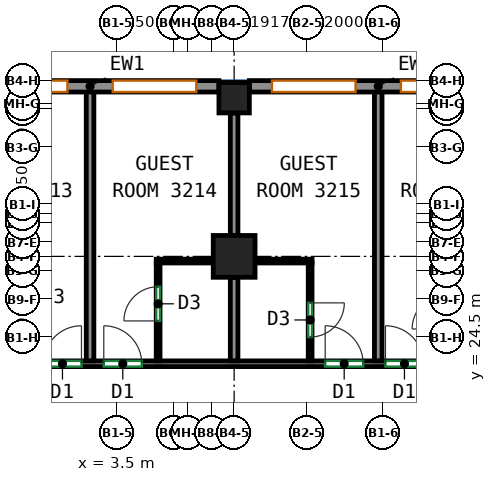
"""IFC4 building model, lengths in metres.
Left out: names, types, materials, properties, quantities, classifications, styles, units other than length and angle.
Written with IfcOpenShell. Run it as: python <this file> out.ifc"""

import sys

from ifc_helpers import new_model, si_unit, direction, frame, frame_2d, origin, origin_2d, place, context, subcontext, project, spatial, rectangle, extrude, source, transform, mapped, element, fill, save


model = new_model("IFC4")
c1 = context("Model", 3, precision=1e-05, world=origin(), true_north=direction((0.0, 1.0)))
c2 = subcontext(c1, "Body", "Model", "MODEL_VIEW")
j1 = project(units=[si_unit("LENGTHUNIT", "METRE"), si_unit("PLANEANGLEUNIT", "RADIAN")], contexts=[c1])
p1 = place(None, origin())
s1 = spatial("IfcSite", under=j1, at=p1, CompositionType="ELEMENT")
p2 = place(p1, origin())
s2 = spatial("IfcBuilding", under=s1, at=p2, CompositionType="ELEMENT")
p3 = place(p2, frame((0.0, 0.0, 143.9)))
s3 = spatial("IfcBuildingStorey", under=s2, at=p3, CompositionType="ELEMENT", Elevation=143.9)
m1 = source(origin(), c2, "Body", "SweptSolid", [
    extrude(rectangle(XDim=1.1, YDim=1.1, at=origin_2d()), origin(), (0.0, 0.0, 1.0), 3.12),
])
p4 = place(p3, frame((6.583, 26.625, 0.0), z_axis=(0.0, 0.0, 1.0), x_axis=(1.0, 0.0, 0.0)))
e1 = element("IfcColumn", 1, at=p4, inside=s3, PredefinedType="COLUMN", context=c2, shape_type="MappedRepresentation", body=[
    mapped(m1, transform((0.0, 0.0, 0.0))),
])
m2 = source(origin(), c2, "Body", "SweptSolid", [
    extrude(rectangle(XDim=0.8, YDim=0.8, at=origin_2d()), origin(), (0.0, 0.0, 1.0), 3.12),
])
p5 = place(p3, frame((6.583, 30.8, 0.0), z_axis=(0.0, 0.0, 1.0), x_axis=(1.0, 0.0, 0.0)))
e2 = element("IfcColumn", 2, at=p5, inside=s3, PredefinedType="COLUMN", context=c2, shape_type="MappedRepresentation", body=[
    mapped(m2, transform((0.0, 0.0, 0.0))),
])
m3 = source(origin(), c2, "Body", "SweptSolid", [
    extrude(rectangle(XDim=6.783, YDim=0.3, at=frame_2d((3.392, 0.0))), origin(), (0.0, 0.0, 1.0), 3.12),
])
p6 = place(p3, frame((13.767, 31.1, 0.0), z_axis=(0.0, 0.0, 1.0), x_axis=(-1.0, 0.0, 0.0)))
e3 = element("IfcWall", 3, at=p6, inside=s3, PredefinedType="SOLIDWALL", context=c2, shape_type="MappedRepresentation", body=[
    mapped(m3, transform((0.0, 0.0, 0.0))),
])
p7 = place(p6, frame((0.596, 0.0, 0.85)))
e4 = element("IfcOpeningElement", 4, at=p7, cuts=e3, PredefinedType="OPENING", context=c2, shape_type="SweptSolid", body=[
    extrude(rectangle(XDim=2.2, YDim=1.95, at=frame_2d((1.1, 0.975))), frame((0.0, 0.16, 0.0), z_axis=(0.0, -1.0, 0.0), x_axis=(1.0, 0.0, 0.0)), (0.0, 0.0, 1.0), 0.32),
])
p8 = place(p6, frame((3.988, 0.0, 0.85)))
e5 = element("IfcOpeningElement", 5, at=p8, cuts=e3, PredefinedType="OPENING", context=c2, shape_type="SweptSolid", body=[
    extrude(rectangle(XDim=2.2, YDim=1.95, at=frame_2d((1.1, 0.975))), frame((0.0, 0.16, 0.0), z_axis=(0.0, -1.0, 0.0), x_axis=(1.0, 0.0, 0.0)), (0.0, 0.0, 1.0), 0.32),
])
m4 = source(origin(), c2, "Body", "SweptSolid", [
    extrude(rectangle(XDim=6.783, YDim=0.3, at=frame_2d((3.392, 0.0))), origin(), (0.0, 0.0, 1.0), 3.12),
])
p9 = place(p3, frame((6.183, 31.1, 0.0), z_axis=(0.0, 0.0, 1.0), x_axis=(-1.0, 0.0, 0.0)))
e6 = element("IfcWall", 6, at=p9, inside=s3, PredefinedType="SOLIDWALL", context=c2, shape_type="MappedRepresentation", body=[
    mapped(m4, transform((0.0, 0.0, 0.0))),
])
p10 = place(p9, frame((0.596, 0.0, 0.85)))
e7 = element("IfcOpeningElement", 7, at=p10, cuts=e6, PredefinedType="OPENING", context=c2, shape_type="SweptSolid", body=[
    extrude(rectangle(XDim=2.2, YDim=1.95, at=frame_2d((1.1, 0.975))), frame((0.0, 0.16, 0.0), z_axis=(0.0, -1.0, 0.0), x_axis=(1.0, 0.0, 0.0)), (0.0, 0.0, 1.0), 0.32),
])
p11 = place(p9, frame((3.988, 0.0, 0.85)))
e8 = element("IfcOpeningElement", 8, at=p11, cuts=e6, PredefinedType="OPENING", context=c2, shape_type="SweptSolid", body=[
    extrude(rectangle(XDim=2.2, YDim=1.95, at=frame_2d((1.1, 0.975))), frame((0.0, 0.16, 0.0), z_axis=(0.0, -1.0, 0.0), x_axis=(1.0, 0.0, 0.0)), (0.0, 0.0, 1.0), 0.32),
])
p12 = place(p3, frame((-20.059, 23.8, 0.0), z_axis=(0.0, 0.0, 1.0), x_axis=(1.0, 0.0, 0.0)))
e9 = element("IfcWall", 9, at=p12, inside=s3, PredefinedType="PARTITIONING", context=c2, shape_type="SweptSolid", body=[
    extrude(rectangle(XDim=41.909, YDim=0.15, at=frame_2d((20.955, 0.0))), origin(), (0.0, 0.0, 1.0), 3.12),
])
p13 = place(p12, frame((0.401, 0.0, 0.0)))
e10 = element("IfcOpeningElement", 10, at=p13, cuts=e9, PredefinedType="OPENING", context=c2, shape_type="SweptSolid", body=[
    extrude(rectangle(XDim=1.0, YDim=2.1, at=frame_2d((0.5, 1.05))), frame((0.0, 0.085, 0.0), z_axis=(0.0, -1.0, 0.0), x_axis=(1.0, 0.0, 0.0)), (0.0, 0.0, 1.0), 0.17),
])
p14 = place(p12, frame((6.082, 0.0, 0.0)))
e11 = element("IfcOpeningElement", 11, at=p14, cuts=e9, PredefinedType="OPENING", context=c2, shape_type="SweptSolid", body=[
    extrude(rectangle(XDim=1.0, YDim=2.1, at=frame_2d((0.5, 1.05))), frame((0.0, 0.085, 0.0), z_axis=(0.0, -1.0, 0.0), x_axis=(1.0, 0.0, 0.0)), (0.0, 0.0, 1.0), 0.17),
])
p15 = place(p12, frame((8.08, 0.0, 0.0)))
e12 = element("IfcOpeningElement", 12, at=p15, cuts=e9, PredefinedType="OPENING", context=c2, shape_type="SweptSolid", body=[
    extrude(rectangle(XDim=1.0, YDim=2.1, at=frame_2d((0.5, 1.05))), frame((0.0, 0.085, 0.0), z_axis=(0.0, -1.0, 0.0), x_axis=(1.0, 0.0, 0.0)), (0.0, 0.0, 1.0), 0.17),
])
p16 = place(p12, frame((13.769, 0.0, 0.0)))
e13 = element("IfcOpeningElement", 13, at=p16, cuts=e9, PredefinedType="OPENING", context=c2, shape_type="SweptSolid", body=[
    extrude(rectangle(XDim=1.0, YDim=2.1, at=frame_2d((0.5, 1.05))), frame((0.0, 0.085, 0.0), z_axis=(0.0, -1.0, 0.0), x_axis=(1.0, 0.0, 0.0)), (0.0, 0.0, 1.0), 0.17),
])
p17 = place(p12, frame((15.56, 0.0, 0.0)))
e14 = element("IfcOpeningElement", 14, at=p17, cuts=e9, PredefinedType="OPENING", context=c2, shape_type="SweptSolid", body=[
    extrude(rectangle(XDim=1.0, YDim=2.1, at=frame_2d((0.5, 1.05))), frame((0.0, 0.085, 0.0), z_axis=(0.0, -1.0, 0.0), x_axis=(1.0, 0.0, 0.0)), (0.0, 0.0, 1.0), 0.17),
])
p18 = place(p12, frame((21.625, 0.0, 0.0)))
e15 = element("IfcOpeningElement", 15, at=p18, cuts=e9, PredefinedType="OPENING", context=c2, shape_type="SweptSolid", body=[
    extrude(rectangle(XDim=1.0, YDim=2.1, at=frame_2d((0.5, 1.05))), frame((0.0, 0.085, 0.0), z_axis=(0.0, -1.0, 0.0), x_axis=(1.0, 0.0, 0.0)), (0.0, 0.0, 1.0), 0.17),
])
p19 = place(p12, frame((23.212, 0.0, 0.0)))
e16 = element("IfcOpeningElement", 16, at=p19, cuts=e9, PredefinedType="OPENING", context=c2, shape_type="SweptSolid", body=[
    extrude(rectangle(XDim=1.0, YDim=2.1, at=frame_2d((0.5, 1.05))), frame((0.0, 0.085, 0.0), z_axis=(0.0, -1.0, 0.0), x_axis=(1.0, 0.0, 0.0)), (0.0, 0.0, 1.0), 0.17),
])
p20 = place(p12, frame((29.038, 0.0, 0.0)))
e17 = element("IfcOpeningElement", 17, at=p20, cuts=e9, PredefinedType="OPENING", context=c2, shape_type="SweptSolid", body=[
    extrude(rectangle(XDim=1.0, YDim=2.1, at=frame_2d((0.5, 1.05))), frame((0.0, 0.085, 0.0), z_axis=(0.0, -1.0, 0.0), x_axis=(1.0, 0.0, 0.0)), (0.0, 0.0, 1.0), 0.17),
])
p21 = place(p12, frame((30.624, 0.0, 0.0)))
e18 = element("IfcOpeningElement", 18, at=p21, cuts=e9, PredefinedType="OPENING", context=c2, shape_type="SweptSolid", body=[
    extrude(rectangle(XDim=1.0, YDim=2.1, at=frame_2d((0.5, 1.05))), frame((0.0, 0.085, 0.0), z_axis=(0.0, -1.0, 0.0), x_axis=(1.0, 0.0, 0.0)), (0.0, 0.0, 1.0), 0.17),
])
p22 = place(p12, frame((36.622, 0.0, 0.0)))
e19 = element("IfcOpeningElement", 19, at=p22, cuts=e9, PredefinedType="OPENING", context=c2, shape_type="SweptSolid", body=[
    extrude(rectangle(XDim=1.0, YDim=2.1, at=frame_2d((0.5, 1.05))), frame((0.0, 0.085, 0.0), z_axis=(0.0, -1.0, 0.0), x_axis=(1.0, 0.0, 0.0)), (0.0, 0.0, 1.0), 0.17),
])
p23 = place(p12, frame((38.516, 0.0, 0.0)))
e20 = element("IfcOpeningElement", 20, at=p23, cuts=e9, PredefinedType="OPENING", context=c2, shape_type="SweptSolid", body=[
    extrude(rectangle(XDim=1.0, YDim=2.1, at=frame_2d((0.5, 1.05))), frame((0.0, 0.085, 0.0), z_axis=(0.0, -1.0, 0.0), x_axis=(1.0, 0.0, 0.0)), (0.0, 0.0, 1.0), 0.17),
])
p24 = place(p3, frame((2.792, 23.877, 0.0), z_axis=(0.0, 0.0, 1.0), x_axis=(0.0, 1.0, 0.0)))
e21 = element("IfcWall", 21, at=p24, inside=s3, PredefinedType="PARTITIONING", context=c2, shape_type="SweptSolid", body=[
    extrude(rectangle(XDim=7.123, YDim=0.2, at=frame_2d((3.562, 0.0))), origin(), (0.0, 0.0, 1.0), 3.12),
])
p25 = place(p3, frame((4.533, 26.502, 0.0), z_axis=(0.0, 0.0, 1.0), x_axis=(1.0, 0.0, 0.0)))
e22 = element("IfcWall", 22, at=p25, inside=s3, PredefinedType="PARTITIONING", context=c2, shape_type="SweptSolid", body=[
    extrude(rectangle(XDim=1.5, YDim=0.1, at=frame_2d((0.75, 0.0))), origin(), (0.0, 0.0, 1.0), 3.12),
])
p26 = place(p3, frame((4.583, 23.877, 0.0), z_axis=(0.0, 0.0, 1.0), x_axis=(0.0, 1.0, 0.0)))
e23 = element("IfcWall", 23, at=p26, inside=s3, PredefinedType="PARTITIONING", context=c2, shape_type="SweptSolid", body=[
    extrude(rectangle(XDim=2.575, YDim=0.1, at=frame_2d((1.288, 0.0))), origin(), (0.0, 0.0, 1.0), 3.12),
])
p27 = place(p26, frame((1.05, 0.0, 0.0)))
e24 = element("IfcOpeningElement", 24, at=p27, cuts=e23, PredefinedType="OPENING", context=c2, shape_type="SweptSolid", body=[
    extrude(rectangle(XDim=0.9, YDim=2.1, at=frame_2d((0.45, 1.05))), frame((0.0, 0.06, 0.0), z_axis=(0.0, -1.0, 0.0), x_axis=(1.0, 0.0, 0.0)), (0.0, 0.0, 1.0), 0.12),
])
p28 = place(p3, frame((6.583, 27.175, 0.0), z_axis=(0.0, 0.0, 1.0), x_axis=(0.0, 1.0, 0.0)))
e25 = element("IfcWall", 25, at=p28, inside=s3, PredefinedType="PARTITIONING", context=c2, shape_type="SweptSolid", body=[
    extrude(rectangle(XDim=3.225, YDim=0.2, at=frame_2d((1.612, 0.0))), origin(), (0.0, 0.0, 1.0), 3.12),
])
p29 = place(p3, frame((6.583, 23.877, 0.0), z_axis=(0.0, 0.0, 1.0), x_axis=(0.0, 1.0, 0.0)))
e26 = element("IfcWall", 26, at=p29, inside=s3, PredefinedType="PARTITIONING", context=c2, shape_type="SweptSolid", body=[
    extrude(rectangle(XDim=2.198, YDim=0.2, at=frame_2d((1.099, 0.0))), origin(), (0.0, 0.0, 1.0), 3.12),
])
p30 = place(p3, frame((7.133, 26.502, 0.0), z_axis=(0.0, 0.0, 1.0), x_axis=(1.0, 0.0, 0.0)))
e27 = element("IfcWall", 27, at=p30, inside=s3, PredefinedType="PARTITIONING", context=c2, shape_type="SweptSolid", body=[
    extrude(rectangle(XDim=1.5, YDim=0.1, at=frame_2d((0.75, 0.0))), origin(), (0.0, 0.0, 1.0), 3.12),
])
p31 = place(p3, frame((8.583, 26.452, 0.0), z_axis=(0.0, 0.0, 1.0), x_axis=(0.0, -1.0, 0.0)))
e28 = element("IfcWall", 28, at=p31, inside=s3, PredefinedType="PARTITIONING", context=c2, shape_type="SweptSolid", body=[
    extrude(rectangle(XDim=2.575, YDim=0.1, at=frame_2d((1.288, 0.0))), origin(), (0.0, 0.0, 1.0), 3.12),
])
p32 = place(p31, frame((1.05, 0.0, 0.0)))
e29 = element("IfcOpeningElement", 29, at=p32, cuts=e28, PredefinedType="OPENING", context=c2, shape_type="SweptSolid", body=[
    extrude(rectangle(XDim=0.9, YDim=2.1, at=frame_2d((0.45, 1.05))), frame((0.0, 0.06, 0.0), z_axis=(0.0, -1.0, 0.0), x_axis=(1.0, 0.0, 0.0)), (0.0, 0.0, 1.0), 0.12),
])
p33 = place(p3, frame((10.375, 23.877, 0.0), z_axis=(0.0, 0.0, 1.0), x_axis=(0.0, 1.0, 0.0)))
e30 = element("IfcWall", 30, at=p33, inside=s3, PredefinedType="PARTITIONING", context=c2, shape_type="SweptSolid", body=[
    extrude(rectangle(XDim=7.123, YDim=0.2, at=frame_2d((3.562, 0.0))), origin(), (0.0, 0.0, 1.0), 3.12),
])
p34 = place(p7, origin())
e31 = element("IfcWindow", 31, at=p34, inside=s3, PartitioningType="SINGLE_PANEL", PredefinedType="WINDOW", context=c2, shape_type="SweptSolid", body=[
    extrude(rectangle(XDim=2.2, YDim=1.95, at=frame_2d((1.1, 0.975))), frame((0.0, 0.03, 0.0), z_axis=(0.0, -1.0, 0.0), x_axis=(1.0, 0.0, 0.0)), (0.0, 0.0, 1.0), 0.06),
])
fill(e4, e31)
p35 = place(p8, origin())
e32 = element("IfcWindow", 32, at=p35, inside=s3, PartitioningType="SINGLE_PANEL", PredefinedType="WINDOW", context=c2, shape_type="SweptSolid", body=[
    extrude(rectangle(XDim=2.2, YDim=1.95, at=frame_2d((1.1, 0.975))), frame((0.0, 0.03, 0.0), z_axis=(0.0, -1.0, 0.0), x_axis=(1.0, 0.0, 0.0)), (0.0, 0.0, 1.0), 0.06),
])
fill(e5, e32)
p36 = place(p10, origin())
e33 = element("IfcWindow", 33, at=p36, inside=s3, PartitioningType="SINGLE_PANEL", PredefinedType="WINDOW", context=c2, shape_type="SweptSolid", body=[
    extrude(rectangle(XDim=2.2, YDim=1.95, at=frame_2d((1.1, 0.975))), frame((0.0, 0.03, 0.0), z_axis=(0.0, -1.0, 0.0), x_axis=(1.0, 0.0, 0.0)), (0.0, 0.0, 1.0), 0.06),
])
fill(e7, e33)
p37 = place(p11, origin())
e34 = element("IfcWindow", 34, at=p37, inside=s3, PartitioningType="SINGLE_PANEL", PredefinedType="WINDOW", context=c2, shape_type="SweptSolid", body=[
    extrude(rectangle(XDim=2.2, YDim=1.95, at=frame_2d((1.1, 0.975))), frame((0.0, 0.03, 0.0), z_axis=(0.0, -1.0, 0.0), x_axis=(1.0, 0.0, 0.0)), (0.0, 0.0, 1.0), 0.06),
])
fill(e8, e34)
p38 = place(p18, origin())
e35 = element("IfcDoor", 35, at=p38, inside=s3, OperationType="SINGLE_SWING_RIGHT", PredefinedType="DOOR", context=c2, shape_type="SweptSolid", body=[
    extrude(rectangle(XDim=1.0, YDim=2.1, at=frame_2d((0.5, 1.05))), frame((0.0, 0.025, 0.0), z_axis=(0.0, -1.0, 0.0), x_axis=(1.0, 0.0, 0.0)), (0.0, 0.0, 1.0), 0.05),
])
fill(e15, e35)
p39 = place(p19, origin())
e36 = element("IfcDoor", 36, at=p39, inside=s3, OperationType="SINGLE_SWING_LEFT", PredefinedType="DOOR", context=c2, shape_type="SweptSolid", body=[
    extrude(rectangle(XDim=1.0, YDim=2.1, at=frame_2d((0.5, 1.05))), frame((0.0, 0.025, 0.0), z_axis=(0.0, -1.0, 0.0), x_axis=(1.0, 0.0, 0.0)), (0.0, 0.0, 1.0), 0.05),
])
fill(e16, e36)
p40 = place(p20, origin())
e37 = element("IfcDoor", 37, at=p40, inside=s3, OperationType="SINGLE_SWING_LEFT", PredefinedType="DOOR", context=c2, shape_type="SweptSolid", body=[
    extrude(rectangle(XDim=1.0, YDim=2.1, at=frame_2d((0.5, 1.05))), frame((0.0, 0.025, 0.0), z_axis=(0.0, -1.0, 0.0), x_axis=(1.0, 0.0, 0.0)), (0.0, 0.0, 1.0), 0.05),
])
fill(e17, e37)
p41 = place(p21, origin())
e38 = element("IfcDoor", 38, at=p41, inside=s3, OperationType="SINGLE_SWING_LEFT", PredefinedType="DOOR", context=c2, shape_type="SweptSolid", body=[
    extrude(rectangle(XDim=1.0, YDim=2.1, at=frame_2d((0.5, 1.05))), frame((0.0, 0.025, 0.0), z_axis=(0.0, -1.0, 0.0), x_axis=(1.0, 0.0, 0.0)), (0.0, 0.0, 1.0), 0.05),
])
fill(e18, e38)
p42 = place(p32, origin())
e39 = element("IfcDoor", 39, at=p42, inside=s3, OperationType="SINGLE_SWING_LEFT", PredefinedType="DOOR", context=c2, shape_type="SweptSolid", body=[
    extrude(rectangle(XDim=0.9, YDim=2.1, at=frame_2d((0.45, 1.05))), frame((0.0, 0.025, 0.0), z_axis=(0.0, -1.0, 0.0), x_axis=(1.0, 0.0, 0.0)), (0.0, 0.0, 1.0), 0.05),
])
fill(e29, e39)
p43 = place(p27, origin())
e40 = element("IfcDoor", 40, at=p43, inside=s3, OperationType="SINGLE_SWING_LEFT", PredefinedType="DOOR", context=c2, shape_type="SweptSolid", body=[
    extrude(rectangle(XDim=0.9, YDim=2.1, at=frame_2d((0.45, 1.05))), frame((0.0, 0.025, 0.0), z_axis=(0.0, -1.0, 0.0), x_axis=(1.0, 0.0, 0.0)), (0.0, 0.0, 1.0), 0.05),
])
fill(e24, e40)
save(model, sys.argv[1])
